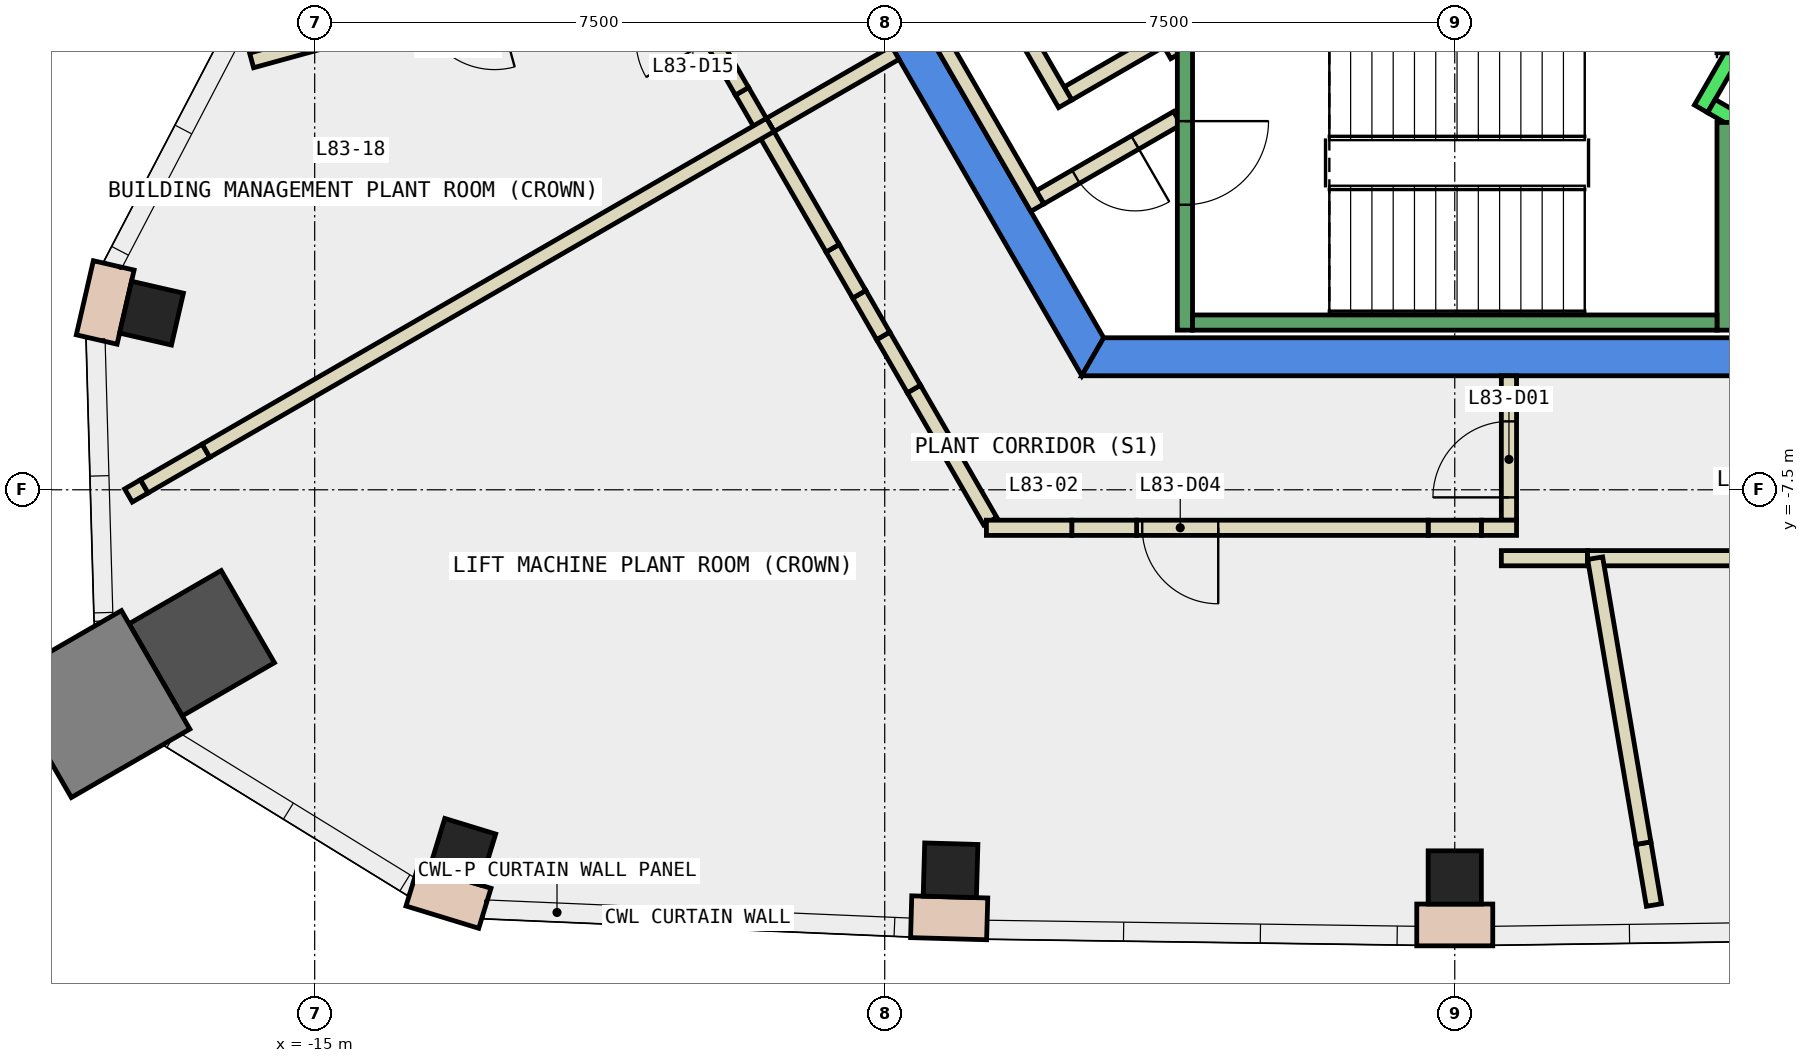
"""IFC4 building model, lengths in metres.
Left out: names, types, materials, properties, quantities, classifications, styles, units other than length and angle.
Written with IfcOpenShell. Run it as: python <this file> out.ifc"""

import sys

from ifc_helpers import new_model, si_unit, direction, frame, frame_2d, origin, origin_2d, place, context, subcontext, project, spatial, polyline, rectangle, outline, extrude, element, fill, save


model = new_model("IFC4")
c1 = context("Model", 3, precision=1e-05, world=origin(), true_north=direction((0.0, 1.0)))
c2 = subcontext(c1, "Body", "Model", "MODEL_VIEW")
j1 = project(units=[si_unit("LENGTHUNIT", "METRE"), si_unit("PLANEANGLEUNIT", "RADIAN")], contexts=[c1])
p1 = place(None, origin())
s1 = spatial("IfcSite", under=j1, at=p1, CompositionType="ELEMENT")
p2 = place(p1, origin())
s2 = spatial("IfcBuilding", under=s1, at=p2, CompositionType="ELEMENT")
p3 = place(p2, frame((0.0, 0.0, 353.9)))
s3 = spatial("IfcBuildingStorey", under=s2, at=p3, CompositionType="ELEMENT", Elevation=353.9)
for number, where, z_axis, x_axis in (
    (1, (-13.056, -12.261, -0.35), (0.0, 0.0, 1.0), (-0.956, 0.293, 0.0)),
    (2, (-6.634, -12.506, -0.35), (0.0, 0.0, 1.0), (-1.0, 0.028, 0.0)),
    (3, (0.0, -12.6, -0.35), (0.0, 0.0, 1.0), (1.0, 0.0, 0.0)),
    (4, (-17.147, -5.176, -0.35), (0.0, 0.0, 1.0), (0.224, 0.974, 0.0)),
):
    element("IfcColumn", number, at=place(p3, frame(where, z_axis=z_axis, x_axis=x_axis)), inside=s3, PredefinedType="COLUMN", context=c2, shape_type="SweptSolid", body=[
        extrude(rectangle(XDim=0.7, YDim=0.7, at=origin_2d()), origin(), (0.0, 0.0, 1.0), 4.4),
    ])
p4 = place(p3, frame((-16.486, -9.519, -0.35), z_axis=(0.0, 0.0, 1.0), x_axis=(0.866025403784, 0.5, 0.0)))
e5 = element("IfcColumn", 5, at=p4, inside=s3, PredefinedType="COLUMN", context=c2, shape_type="SweptSolid", body=[
    extrude(rectangle(XDim=1.4, YDim=1.4, at=origin_2d()), origin(), (0.0, 0.0, 1.0), 4.4),
])
p5 = place(p3, frame((-17.872, -10.319, -0.35), z_axis=(0.0, 0.0, 1.0), x_axis=(0.866025403784, 0.5, 0.0)))
e6 = element("IfcColumn", 6, at=p5, inside=s3, PredefinedType="COLUMN", context=c2, shape_type="SweptSolid", body=[
    extrude(rectangle(XDim=1.8, YDim=1.8, at=origin_2d()), origin(), (0.0, 0.0, 1.0), 4.4),
])
p6 = place(p3, frame((0.0, 0.0, -0.35)))
e7 = element("IfcWall", 7, at=p6, inside=s3, PredefinedType="SHEAR", context=c2, shape_type="SweptSolid", body=[
    extrude(outline(polyline([(-9.815, 2.5), (-4.907, -6.0), (-4.619, -5.5), (-9.238, 2.5), (-9.815, 2.5)])), origin(), (0.0, 0.0, 1.0), 4.4),
])
p7 = place(p3, frame((0.0, 0.0, -0.35)))
e8 = element("IfcWall", 8, at=p7, inside=s3, PredefinedType="SHEAR", context=c2, shape_type="SweptSolid", body=[
    extrude(outline(polyline([(3.75, -6.0), (3.75, -5.5), (-4.619, -5.5), (-4.907, -6.0), (3.75, -6.0)])), origin(), (0.0, 0.0, 1.0), 4.4),
])
p8 = place(p3, frame((-17.644, -4.548, 0.0), z_axis=(0.0, 0.0, 1.0), x_axis=(-0.223825449309, -0.974629246556, 0.0)))
e9 = element("IfcWall", 9, at=p8, inside=s3, PredefinedType="STANDARD", context=c2, shape_type="SweptSolid", body=[
    extrude(rectangle(XDim=1.0, YDim=0.55, at=frame_2d((0.5, 0.0))), origin(), (0.0, 0.0, 1.0), 4.05),
])
p9 = place(p3, frame((-13.718, -12.713, 0.0), z_axis=(0.0, 0.0, 1.0), x_axis=(0.95613166039, -0.292937276563, 0.0)))
e10 = element("IfcWall", 10, at=p9, inside=s3, PredefinedType="STANDARD", context=c2, shape_type="SweptSolid", body=[
    extrude(rectangle(XDim=1.001, YDim=0.55, at=frame_2d((0.5, 0.0))), origin(), (0.0, 0.0, 1.0), 4.05),
])
p10 = place(p3, frame((-7.152, -13.117, 0.0), z_axis=(0.0, 0.0, 1.0), x_axis=(0.999606097148, -0.028065112591, 0.0)))
e11 = element("IfcWall", 11, at=p10, inside=s3, PredefinedType="STANDARD", context=c2, shape_type="SweptSolid", body=[
    extrude(rectangle(XDim=1.0, YDim=0.55, at=frame_2d((0.5, 0.0))), origin(), (0.0, 0.0, 1.0), 4.05),
])
p11 = place(p3, frame((-0.5, -13.225, 0.0), z_axis=(0.0, 0.0, 1.0), x_axis=(1.0, 0.0, 0.0)))
e12 = element("IfcWall", 12, at=p11, inside=s3, PredefinedType="STANDARD", context=c2, shape_type="SweptSolid", body=[
    extrude(rectangle(XDim=1.0, YDim=0.55, at=frame_2d((0.5, 0.0))), origin(), (0.0, 0.0, 1.0), 4.05),
])
p12 = place(p3, frame((-3.9, -1.599, 0.0), z_axis=(0.0, 0.0, 1.0), x_axis=(-0.865969445389, -0.500096910261, 0.0)))
e13 = element("IfcWall", 13, at=p12, inside=s3, PredefinedType="PARTITIONING", context=c2, shape_type="SweptSolid", body=[
    extrude(rectangle(XDim=1.373, YDim=0.2, at=frame_2d((0.687, 0.0))), origin(), (0.0, 0.0, 1.0), 4.05),
])
p13 = place(p3, frame((-5.126, -2.422, 0.0), z_axis=(0.0, 0.0, 1.0), x_axis=(-0.500062241894, 0.865989465428, 0.0)))
e14 = element("IfcWall", 14, at=p13, inside=s3, PredefinedType="PARTITIONING", context=c2, shape_type="SweptSolid", body=[
    extrude(rectangle(XDim=1.7, YDim=0.2, at=frame_2d((0.85, 0.0))), origin(), (0.0, 0.0, 1.0), 4.05),
])
p14 = place(p3, frame((-5.492, -3.788, 0.0), z_axis=(0.0, 0.0, 1.0), x_axis=(-0.500008949224, 0.866020236886, 0.0)))
e15 = element("IfcWall", 15, at=p14, inside=s3, PredefinedType="PARTITIONING", context=c2, shape_type="SweptSolid", body=[
    extrude(rectangle(XDim=2.68, YDim=0.2, at=frame_2d((1.34, 0.0))), origin(), (0.0, 0.0, 1.0), 4.05),
])
p15 = place(p3, frame((-4.145, -0.92, 0.0), z_axis=(0.0, 0.0, 1.0), x_axis=(0.499743786207, -0.866173278362, 0.0)))
e16 = element("IfcWall", 16, at=p15, inside=s3, PredefinedType="PARTITIONING", context=c2, shape_type="SweptSolid", body=[
    extrude(rectangle(XDim=0.991, YDim=0.2, at=frame_2d((0.495, 0.0))), origin(), (0.0, 0.0, 1.0), 4.05),
])
p16 = place(p3, frame((-3.65, -2.61, 0.0), z_axis=(0.0, 0.0, 1.0), x_axis=(-0.866072462134, -0.499918483688, 0.0)))
e17 = element("IfcWall", 17, at=p16, inside=s3, PredefinedType="PARTITIONING", context=c2, shape_type="SweptSolid", body=[
    extrude(rectangle(XDim=2.084, YDim=0.2, at=frame_2d((1.042, 0.0))), origin(), (0.0, 0.0, 1.0), 4.05),
])
p17 = place(p16, frame((0.642, 0.0, 0.0)))
e18 = element("IfcOpeningElement", 18, at=p17, cuts=e17, PredefinedType="OPENING", context=c2, shape_type="SweptSolid", body=[
    extrude(rectangle(XDim=0.9, YDim=2.1, at=frame_2d((0.45, 1.05))), frame((0.0, 0.11, 0.0), z_axis=(0.0, -1.0, 0.0), x_axis=(1.0, 0.0, 0.0)), (0.0, 0.0, 1.0), 0.22),
])
p18 = place(p3, frame((0.713, -7.9, 0.0), z_axis=(0.0, 0.0, 1.0), x_axis=(0.0, 1.0, 0.0)))
e19 = element("IfcWall", 19, at=p18, inside=s3, PredefinedType="PARTITIONING", context=c2, shape_type="SweptSolid", body=[
    extrude(rectangle(XDim=1.9, YDim=0.2, at=frame_2d((0.95, 0.0))), origin(), (0.0, 0.0, 1.0), 4.05),
])
p19 = place(p18, frame((0.3, 0.0, 0.0)))
e20 = element("IfcOpeningElement", 20, at=p19, cuts=e19, PredefinedType="OPENING", context=c2, shape_type="SweptSolid", body=[
    extrude(rectangle(XDim=1.0, YDim=2.1, at=frame_2d((0.5, 1.05))), frame((0.0, 0.11, 0.0), z_axis=(0.0, -1.0, 0.0), x_axis=(1.0, 0.0, 0.0)), (0.0, 0.0, 1.0), 0.22),
])
p20 = place(p3, frame((1.747, -8.4, 0.0), z_axis=(0.0, 0.0, 1.0), x_axis=(-1.0, 0.0, 0.0)))
e21 = element("IfcWall", 21, at=p20, inside=s3, PredefinedType="PARTITIONING", context=c2, shape_type="SweptSolid", body=[
    extrude(rectangle(XDim=1.134, YDim=0.2, at=frame_2d((0.567, 0.0))), origin(), (0.0, 0.0, 1.0), 4.05),
])
p21 = place(p3, frame((0.813, -8.0, 0.0), z_axis=(0.0, 0.0, 1.0), x_axis=(-1.0, 0.0, 0.0)))
e22 = element("IfcWall", 22, at=p21, inside=s3, PredefinedType="PARTITIONING", context=c2, shape_type="SweptSolid", body=[
    extrude(rectangle(XDim=0.463, YDim=0.2, at=frame_2d((0.231, 0.0))), origin(), (0.0, 0.0, 1.0), 4.05),
])
p22 = place(p3, frame((-6.112, -7.913, 0.0), z_axis=(0.0, 0.0, 1.0), x_axis=(-0.499957508411, 0.866049934925, 0.0)))
e23 = element("IfcWall", 23, at=p22, inside=s3, PredefinedType="PARTITIONING", context=c2, shape_type="SweptSolid", body=[
    extrude(rectangle(XDim=2.008, YDim=0.2, at=frame_2d((1.004, 0.0))), origin(), (0.0, 0.0, 1.0), 4.05),
])
p23 = place(p3, frame((-9.006, -2.7, 0.0), z_axis=(0.0, 0.0, 1.0), x_axis=(0.865980106173, 0.500078449558, 0.0)))
e24 = element("IfcWall", 24, at=p23, inside=s3, PredefinedType="PARTITIONING", context=c2, shape_type="SweptSolid", body=[
    extrude(rectangle(XDim=1.9, YDim=0.2, at=frame_2d((0.95, 0.0))), origin(), (0.0, 0.0, 1.0), 4.05),
])
p24 = place(p3, frame((2.62, -12.963, 0.0), z_axis=(0.0, 0.0, 1.0), x_axis=(-0.167371315192, 0.985893930832, 0.0)))
e25 = element("IfcWall", 25, at=p24, inside=s3, PredefinedType="PARTITIONING", context=c2, shape_type="SweptSolid", body=[
    extrude(rectangle(XDim=0.826, YDim=0.2, at=frame_2d((0.413, 0.0))), origin(), (0.0, 0.0, 1.0), 1.95),
])
p25 = place(p3, frame((-17.45, -7.575, 0.0), z_axis=(0.0, 0.0, 1.0), x_axis=(0.866422508423, 0.499311562953, 0.0)))
e26 = element("IfcWall", 26, at=p25, inside=s3, PredefinedType="PARTITIONING", context=c2, shape_type="SweptSolid", body=[
    extrude(rectangle(XDim=0.24, YDim=0.2, at=frame_2d((0.12, 0.0))), origin(), (0.0, 0.0, 1.0), 4.05),
])
p26 = place(p3, frame((-9.093, -2.75, 0.0), z_axis=(0.0, 0.0, 1.0), x_axis=(-0.500427620203, 0.86577837634, 0.0)))
e27 = element("IfcWall", 27, at=p26, inside=s3, PredefinedType="PARTITIONING", context=c2, shape_type="SweptSolid", body=[
    extrude(rectangle(XDim=0.569, YDim=0.2, at=frame_2d((0.285, 0.0))), origin(), (0.0, 0.0, 1.0), 4.05),
])
p27 = place(p3, frame((4.362, -8.4, 0.0), z_axis=(0.0, 0.0, 1.0), x_axis=(-1.0, 0.0, 0.0)))
e28 = element("IfcWall", 28, at=p27, inside=s3, PredefinedType="PARTITIONING", context=c2, shape_type="SweptSolid", body=[
    extrude(rectangle(XDim=2.615, YDim=0.2, at=frame_2d((1.308, 0.0))), origin(), (0.0, 0.0, 1.0), 4.05),
])
p28 = place(p3, frame((0.35, -8.0, 0.0), z_axis=(0.0, 0.0, 1.0), x_axis=(-1.0, 0.0, 0.0)))
e29 = element("IfcWall", 29, at=p28, inside=s3, PredefinedType="PARTITIONING", context=c2, shape_type="SweptSolid", body=[
    extrude(rectangle(XDim=0.7, YDim=0.2, at=frame_2d((0.35, 0.0))), origin(), (0.0, 0.0, 1.0), 1.95),
])
p29 = place(p3, frame((-0.35, -8.0, 0.0), z_axis=(0.0, 0.0, 1.0), x_axis=(-1.0, 0.0, 0.0)))
e30 = element("IfcWall", 30, at=p29, inside=s3, PredefinedType="PARTITIONING", context=c2, shape_type="SweptSolid", body=[
    extrude(rectangle(XDim=3.836, YDim=0.2, at=frame_2d((1.918, 0.0))), origin(), (0.0, 0.0, 1.0), 4.05),
])
p30 = place(p29, frame((2.762, 0.0, 0.0)))
e31 = element("IfcOpeningElement", 31, at=p30, cuts=e30, PredefinedType="OPENING", context=c2, shape_type="SweptSolid", body=[
    extrude(rectangle(XDim=1.0, YDim=2.1, at=frame_2d((0.5, 1.05))), frame((0.0, 0.11, 0.0), z_axis=(0.0, -1.0, 0.0), x_axis=(1.0, 0.0, 0.0)), (0.0, 0.0, 1.0), 0.22),
])
p31 = place(p3, frame((-4.186, -8.0, 0.0), z_axis=(0.0, 0.0, 1.0), x_axis=(-1.0, 0.0, 0.0)))
e32 = element("IfcWall", 32, at=p31, inside=s3, PredefinedType="PARTITIONING", context=c2, shape_type="SweptSolid", body=[
    extrude(rectangle(XDim=0.853, YDim=0.2, at=frame_2d((0.427, 0.0))), origin(), (0.0, 0.0, 1.0), 1.95),
])
p32 = place(p3, frame((-5.039, -8.0, 0.0), z_axis=(0.0, 0.0, 1.0), x_axis=(-1.0, 0.0, 0.0)))
e33 = element("IfcWall", 33, at=p32, inside=s3, PredefinedType="PARTITIONING", context=c2, shape_type="SweptSolid", body=[
    extrude(rectangle(XDim=1.123, YDim=0.2, at=frame_2d((0.562, 0.0))), origin(), (0.0, 0.0, 1.0), 4.05),
])
p33 = place(p3, frame((-7.116, -6.174, 0.0), z_axis=(0.0, 0.0, 1.0), x_axis=(-0.500463994258, 0.865757350792, 0.0)))
e34 = element("IfcWall", 34, at=p33, inside=s3, PredefinedType="PARTITIONING", context=c2, shape_type="SweptSolid", body=[
    extrude(rectangle(XDim=0.807, YDim=0.2, at=frame_2d((0.404, 0.0))), origin(), (0.0, 0.0, 1.0), 1.95),
])
p34 = place(p3, frame((-7.52, -5.475, 0.0), z_axis=(0.0, 0.0, 1.0), x_axis=(-0.49888522925, 0.866668061046, 0.0)))
e35 = element("IfcWall", 35, at=p34, inside=s3, PredefinedType="PARTITIONING", context=c2, shape_type="SweptSolid", body=[
    extrude(rectangle(XDim=0.631, YDim=0.2, at=frame_2d((0.316, 0.0))), origin(), (0.0, 0.0, 1.0), 4.05),
])
p35 = place(p3, frame((-7.835, -4.928, 0.0), z_axis=(0.0, 0.0, 1.0), x_axis=(-0.500265973451, 0.865871789474, 0.0)))
e36 = element("IfcWall", 36, at=p35, inside=s3, PredefinedType="PARTITIONING", context=c2, shape_type="SweptSolid", body=[
    extrude(rectangle(XDim=0.7, YDim=0.2, at=frame_2d((0.35, 0.0))), origin(), (0.0, 0.0, 1.0), 1.95),
])
p36 = place(p3, frame((-8.185, -4.322, 0.0), z_axis=(0.0, 0.0, 1.0), x_axis=(-0.500145398563, 0.865941441609, 0.0)))
e37 = element("IfcWall", 37, at=p36, inside=s3, PredefinedType="PARTITIONING", context=c2, shape_type="SweptSolid", body=[
    extrude(rectangle(XDim=1.815, YDim=0.2, at=frame_2d((0.908, 0.0))), origin(), (0.0, 0.0, 1.0), 4.05),
])
p37 = place(p3, frame((2.482, -12.149, 0.0), z_axis=(0.0, 0.0, 1.0), x_axis=(-0.167001385459, 0.985956660941, 0.0)))
e38 = element("IfcWall", 38, at=p37, inside=s3, PredefinedType="PARTITIONING", context=c2, shape_type="SweptSolid", body=[
    extrude(rectangle(XDim=3.802, YDim=0.2, at=frame_2d((1.901, 0.0))), origin(), (0.0, 0.0, 1.0), 4.05),
])
p38 = place(p3, frame((-17.242, -7.455, 0.0), z_axis=(0.0, 0.0, 1.0), x_axis=(0.865942754999, 0.50014312458, 0.0)))
e39 = element("IfcWall", 39, at=p38, inside=s3, PredefinedType="PARTITIONING", context=c2, shape_type="SweptSolid", body=[
    extrude(rectangle(XDim=0.938, YDim=0.2, at=frame_2d((0.469, 0.0))), origin(), (0.0, 0.0, 1.0), 1.95),
])
p39 = place(p3, frame((-16.43, -6.986, 0.0), z_axis=(0.0, 0.0, 1.0), x_axis=(0.866026229868, 0.499998569178, 0.0)))
e40 = element("IfcWall", 40, at=p39, inside=s3, PredefinedType="PARTITIONING", context=c2, shape_type="SweptSolid", body=[
    extrude(rectangle(XDim=8.572, YDim=0.2, at=frame_2d((4.286, 0.0))), origin(), (0.0, 0.0, 1.0), 4.05),
])
p40 = place(p3, frame((-9.378, -2.257, 0.0), z_axis=(0.0, 0.0, 1.0), x_axis=(-0.499820234884, 0.866129166349, 0.0)))
e41 = element("IfcWall", 41, at=p40, inside=s3, PredefinedType="PARTITIONING", context=c2, shape_type="SweptSolid", body=[
    extrude(rectangle(XDim=0.72, YDim=0.2, at=frame_2d((0.36, 0.0))), origin(), (0.0, 0.0, 1.0), 1.95),
])
p41 = place(p3, frame((-14.698, -1.54, 0.0), z_axis=(0.0, 0.0, 1.0), x_axis=(-0.964267835865, -0.264929312679, 0.0)))
e42 = element("IfcWall", 42, at=p41, inside=s3, PredefinedType="PARTITIONING", context=c2, shape_type="SweptSolid", body=[
    extrude(rectangle(XDim=1.174, YDim=0.2, at=frame_2d((0.587, 0.0))), origin(), (0.0, 0.0, 1.0), 1.95),
])
p42 = place(p3, frame((3.24, -2.488, 0.0), z_axis=(0.0, 0.0, 1.0), x_axis=(0.49994636267, 0.866056369097, 0.0)))
e43 = element("IfcWall", 43, at=p42, inside=s3, PredefinedType="STANDARD", context=c2, shape_type="SweptSolid", body=[
    extrude(rectangle(XDim=2.8, YDim=0.2, at=frame_2d((1.4, 0.0))), origin(), (0.0, 0.0, 1.0), 4.05),
])
p43 = place(p42, frame((1.225, 0.0, 0.0)))
e44 = element("IfcOpeningElement", 44, at=p43, cuts=e43, PredefinedType="OPENING", context=c2, shape_type="SweptSolid", body=[
    extrude(rectangle(XDim=1.1, YDim=2.1, at=frame_2d((0.55, 1.05))), frame((0.0, 0.11, 0.0), z_axis=(0.0, -1.0, 0.0), x_axis=(1.0, 0.0, 0.0)), (0.0, 0.0, 1.0), 0.22),
])
p44 = place(p3, frame((3.377, -2.452, 0.0), z_axis=(0.0, 0.0, 1.0), x_axis=(0.865955154139, -0.50012165622, 0.0)))
e45 = element("IfcWall", 45, at=p44, inside=s3, PredefinedType="STANDARD", context=c2, shape_type="SweptSolid", body=[
    extrude(rectangle(XDim=2.4, YDim=0.2, at=frame_2d((1.2, 0.0))), origin(), (0.0, 0.0, 1.0), 4.05),
])
p45 = place(p3, frame((-3.55, -1.0, 0.0), z_axis=(0.0, 0.0, 1.0), x_axis=(0.0, -1.0, 0.0)))
e46 = element("IfcWall", 46, at=p45, inside=s3, PredefinedType="STANDARD", context=c2, shape_type="SweptSolid", body=[
    extrude(rectangle(XDim=4.4, YDim=0.2, at=frame_2d((2.2, 0.0))), origin(), (0.0, 0.0, 1.0), 4.05),
])
p46 = place(p45, frame((1.65, 0.0, 0.0)))
e47 = element("IfcOpeningElement", 47, at=p46, cuts=e46, PredefinedType="OPENING", context=c2, shape_type="SweptSolid", body=[
    extrude(rectangle(XDim=1.1, YDim=2.2, at=frame_2d((0.55, 1.1))), frame((0.0, 0.11, 0.0), z_axis=(0.0, -1.0, 0.0), x_axis=(1.0, 0.0, 0.0)), (0.0, 0.0, 1.0), 0.22),
])
p47 = place(p3, frame((3.55, -2.667, 0.0), z_axis=(0.0, 0.0, 1.0), x_axis=(0.0, -1.0, 0.0)))
e48 = element("IfcWall", 48, at=p47, inside=s3, PredefinedType="STANDARD", context=c2, shape_type="SweptSolid", body=[
    extrude(rectangle(XDim=2.733, YDim=0.2, at=frame_2d((1.366, 0.0))), origin(), (0.0, 0.0, 1.0), 4.05),
])
p48 = place(p3, frame((3.55, -1.0, 0.0), z_axis=(0.0, 0.0, 1.0), x_axis=(0.0, -1.0, 0.0)))
e49 = element("IfcWall", 49, at=p48, inside=s3, PredefinedType="STANDARD", context=c2, shape_type="SweptSolid", body=[
    extrude(rectangle(XDim=0.751, YDim=0.2, at=frame_2d((0.375, 0.0))), origin(), (0.0, 0.0, 1.0), 4.05),
])
p49 = place(p3, frame((-3.45, -5.3, 0.0), z_axis=(0.0, 0.0, 1.0), x_axis=(1.0, 0.0, 0.0)))
e50 = element("IfcWall", 50, at=p49, inside=s3, PredefinedType="STANDARD", context=c2, shape_type="SweptSolid", body=[
    extrude(rectangle(XDim=6.9, YDim=0.2, at=frame_2d((3.45, 0.0))), origin(), (0.0, 0.0, 1.0), 4.05),
])
p50 = place(p19, origin())
e51 = element("IfcDoor", 51, at=p50, inside=s3, OperationType="SINGLE_SWING_LEFT", PredefinedType="DOOR", context=c2, shape_type="SweptSolid", body=[
    extrude(rectangle(XDim=1.0, YDim=2.1, at=frame_2d((0.5, 1.05))), frame((0.0, 0.025, 0.0), z_axis=(0.0, -1.0, 0.0), x_axis=(1.0, 0.0, 0.0)), (0.0, 0.0, 1.0), 0.05),
])
fill(e20, e51)
p51 = place(p30, origin())
e52 = element("IfcDoor", 52, at=p51, inside=s3, OperationType="SINGLE_SWING_RIGHT", PredefinedType="DOOR", context=c2, shape_type="SweptSolid", body=[
    extrude(rectangle(XDim=1.0, YDim=2.1, at=frame_2d((0.5, 1.05))), frame((0.0, 0.025, 0.0), z_axis=(0.0, -1.0, 0.0), x_axis=(1.0, 0.0, 0.0)), (0.0, 0.0, 1.0), 0.05),
])
fill(e31, e52)
p52 = place(p17, origin())
e53 = element("IfcDoor", 53, at=p52, inside=s3, OperationType="SINGLE_SWING_LEFT", PredefinedType="DOOR", context=c2, shape_type="SweptSolid", body=[
    extrude(rectangle(XDim=0.9, YDim=2.1, at=frame_2d((0.45, 1.05))), frame((0.0, 0.025, 0.0), z_axis=(0.0, -1.0, 0.0), x_axis=(1.0, 0.0, 0.0)), (0.0, 0.0, 1.0), 0.05),
])
fill(e18, e53)
p53 = place(p46, origin())
e54 = element("IfcDoor", 54, at=p53, inside=s3, OperationType="SINGLE_SWING_LEFT", PredefinedType="DOOR", context=c2, shape_type="SweptSolid", body=[
    extrude(rectangle(XDim=1.1, YDim=2.2, at=frame_2d((0.55, 1.1))), frame((0.0, 0.025, 0.0), z_axis=(0.0, -1.0, 0.0), x_axis=(1.0, 0.0, 0.0)), (0.0, 0.0, 1.0), 0.05),
])
fill(e47, e54)
save(model, sys.argv[1])
